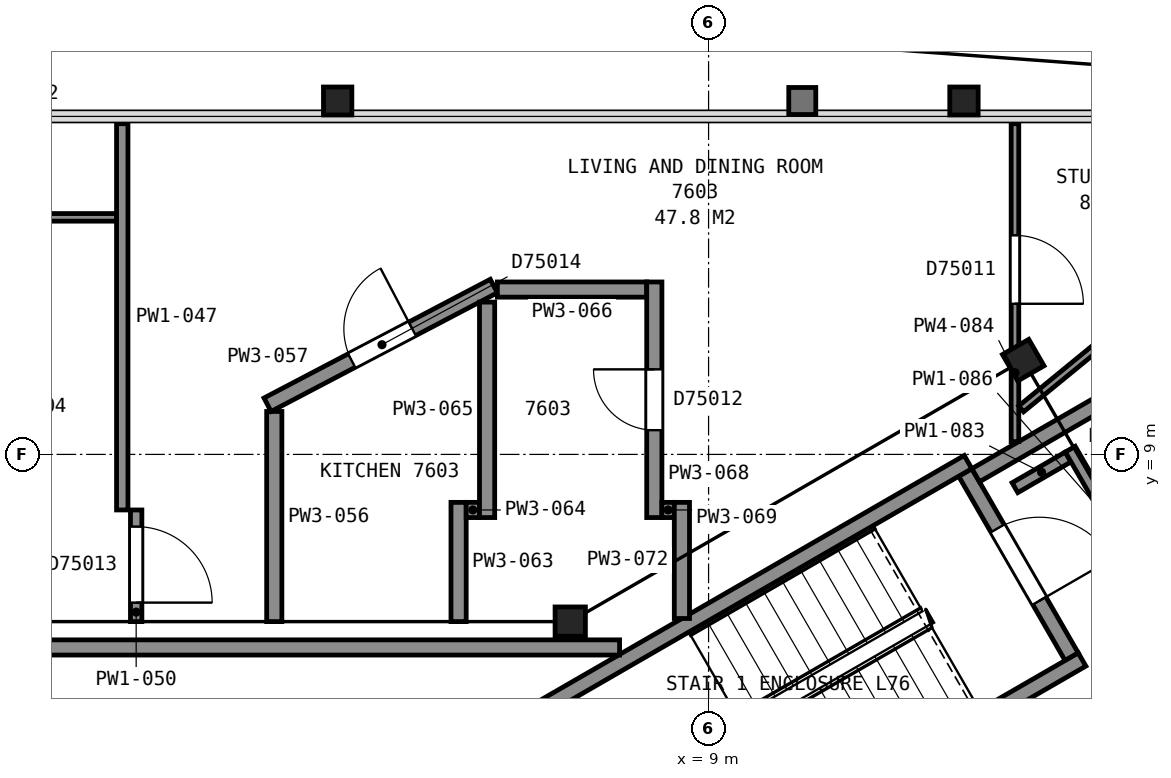
"""IFC4 building model, lengths in metres.
Left out: names, types, materials, properties, quantities, classifications, styles, units other than length and angle.
Written with IfcOpenShell. Run it as: python <this file> out.ifc"""

import sys

from ifc_helpers import new_model, si_unit, direction, frame, frame_2d, origin, origin_2d, place, context, subcontext, project, spatial, rectangle, i_section, extrude, element, fill, save


model = new_model("IFC4")
c1 = context("Model", 3, precision=1e-05, world=origin(), true_north=direction((0.0, 1.0)))
c2 = subcontext(c1, "Body", "Model", "MODEL_VIEW")
j1 = project(units=[si_unit("LENGTHUNIT", "METRE"), si_unit("PLANEANGLEUNIT", "RADIAN")], contexts=[c1])
p1 = place(None, origin())
s1 = spatial("IfcSite", under=j1, at=p1, CompositionType="ELEMENT")
p2 = place(p1, origin())
s2 = spatial("IfcBuilding", under=s1, at=p2, CompositionType="ELEMENT")
p3 = place(p2, frame((0.0, 0.0, 301.0)))
s3 = spatial("IfcBuildingStorey", under=s2, at=p3, CompositionType="ELEMENT", Elevation=301.0)
p4 = place(p3, frame((12.36, 13.65, 0.0), z_axis=(0.0, 0.0, 1.0), x_axis=(1.0, 0.0, 0.0)))
e1 = element("IfcColumn", 1, at=p4, inside=s3, PredefinedType="COLUMN", context=c2, shape_type="SweptSolid", body=[
    extrude(i_section(OverallWidth=0.373, OverallDepth=0.368, WebThickness=0.015, FlangeThickness=0.024, FilletRadius=0.015, at=origin_2d()), origin(), (0.0, 0.0, 1.0), 3.645),
])
p5 = place(p3, frame((4.12, 13.65, 0.0), z_axis=(0.0, 0.0, 1.0), x_axis=(1.0, 0.0, 0.0)))
e2 = element("IfcColumn", 2, at=p5, inside=s3, PredefinedType="COLUMN", context=c2, shape_type="SweptSolid", body=[
    extrude(i_section(OverallWidth=0.373, OverallDepth=0.368, WebThickness=0.015, FlangeThickness=0.024, FilletRadius=0.015, at=origin_2d()), origin(), (0.0, 0.0, 1.0), 3.655),
])
p6 = place(p3, frame((13.14, 10.24, 0.0), z_axis=(0.0, 0.0, 1.0), x_axis=(0.5, -0.866025403784, 0.0)))
e3 = element("IfcColumn", 3, at=p6, inside=s3, PredefinedType="COLUMN", context=c2, shape_type="SweptSolid", body=[
    extrude(i_section(OverallWidth=0.401, OverallDepth=0.399, WebThickness=0.025, FlangeThickness=0.04, FilletRadius=0.015, at=origin_2d()), origin(), (0.0, 0.0, 1.0), 3.7),
])
p7 = place(p3, frame((7.18, 6.8, 0.0), z_axis=(0.0, 0.0, 1.0), x_axis=(1.0, 0.0, 0.0)))
e4 = element("IfcColumn", 4, at=p7, inside=s3, PredefinedType="COLUMN", context=c2, shape_type="SweptSolid", body=[
    extrude(i_section(OverallWidth=0.399, OverallDepth=0.386, WebThickness=0.021, FlangeThickness=0.033, FilletRadius=0.015, at=origin_2d()), origin(), (0.0, 0.0, 1.0), 3.7),
])
p8 = place(p3, frame((13.777, 6.338, 0.0), z_axis=(0.0, 0.0, 1.0), x_axis=(-0.500049511043, 0.865996816683, 0.0)))
e5 = element("IfcWall", 5, at=p8, inside=s3, PredefinedType="PARTITIONING", context=c2, shape_type="SweptSolid", body=[
    extrude(rectangle(XDim=2.8, YDim=0.2, at=frame_2d((1.4, 0.0))), origin(), (0.0, 0.0, 1.0), 3.45),
])
p9 = place(p8, frame((0.85, 0.0, 0.0)))
e6 = element("IfcOpeningElement", 6, at=p9, cuts=e5, PredefinedType="OPENING", context=c2, shape_type="SweptSolid", body=[
    extrude(rectangle(XDim=1.1, YDim=2.1, at=frame_2d((0.55, 1.05))), frame((0.0, 0.11, 0.0), z_axis=(0.0, -1.0, 0.0), x_axis=(1.0, 0.0, 0.0)), (0.0, 0.0, 1.0), 0.22),
])
for number, where, z_axis, x_axis in (
    (7, (6.178, 5.299, 0.0), (0.0, 0.0, 1.0), (0.866, 0.5, 0.0)),
    (8, (7.678, 2.701, 0.0), (0.0, 0.0, 1.0), (0.866, 0.5, 0.0)),
):
    element("IfcWall", number, at=place(p3, frame(where, z_axis=z_axis, x_axis=x_axis)), inside=s3, PredefinedType="PARTITIONING", context=c2, shape_type="SweptSolid", body=[
        extrude(rectangle(XDim=7.2, YDim=0.2, at=frame_2d((3.6, 0.0))), origin(), (0.0, 0.0, 1.0), 3.45),
    ])
p10 = place(p3, frame((7.829, 6.46, 0.0), z_axis=(0.0, 0.0, 1.0), x_axis=(-1.0, 0.0, 0.0)))
e9 = element("IfcWall", 9, at=p10, inside=s3, PredefinedType="PARTITIONING", context=c2, shape_type="SweptSolid", body=[
    extrude(rectangle(XDim=15.658, YDim=0.2, at=frame_2d((7.829, 0.0))), origin(), (0.0, 0.0, 1.0), 3.45),
])
p11 = place(p10, frame((12.168, 0.0, 0.0)))
e10 = element("IfcOpeningElement", 10, at=p11, cuts=e9, PredefinedType="OPENING", context=c2, shape_type="SweptSolid", body=[
    extrude(rectangle(XDim=1.2, YDim=2.1, at=frame_2d((0.6, 1.05))), frame((0.0, 0.11, 0.0), z_axis=(0.0, -1.0, 0.0), x_axis=(1.0, 0.0, 0.0)), (0.0, 0.0, 1.0), 0.22),
])
p12 = place(p3, frame((-3.109, 12.119, 0.0), z_axis=(0.0, 0.0, 1.0), x_axis=(1.0, 0.0, 0.0)))
e11 = element("IfcWall", 11, at=p12, inside=s3, PredefinedType="PARTITIONING", context=c2, shape_type="SweptSolid", body=[
    extrude(rectangle(XDim=4.32, YDim=0.1, at=frame_2d((2.16, 0.0))), origin(), (0.0, 0.0, 1.0), 2.723),
])
p13 = place(p12, frame((1.7, 0.0, 0.0)))
e12 = element("IfcOpeningElement", 12, at=p13, cuts=e11, PredefinedType="OPENING", context=c2, shape_type="SweptSolid", body=[
    extrude(rectangle(XDim=1.0, YDim=2.1, at=frame_2d((0.5, 1.05))), frame((0.0, 0.06, 0.0), z_axis=(0.0, -1.0, 0.0), x_axis=(1.0, 0.0, 0.0)), (0.0, 0.0, 1.0), 0.12),
])
p14 = place(p3, frame((1.286, 8.269, 0.0), z_axis=(0.0, 0.0, 1.0), x_axis=(0.0, 1.0, 0.0)))
e13 = element("IfcWall", 13, at=p14, inside=s3, PredefinedType="PARTITIONING", context=c2, shape_type="SweptSolid", body=[
    extrude(rectangle(XDim=5.082, YDim=0.15, at=frame_2d((2.541, 0.0))), origin(), (0.0, 0.0, 1.0), 2.723),
])
p15 = place(p3, frame((1.469, 8.269, 0.0), z_axis=(0.0, 0.0, 1.0), x_axis=(0.0, -1.0, 0.0)))
e14 = element("IfcWall", 14, at=p15, inside=s3, PredefinedType="PARTITIONING", context=c2, shape_type="SweptSolid", body=[
    extrude(rectangle(XDim=1.469, YDim=0.15, at=frame_2d((0.734, 0.0))), origin(), (0.0, 0.0, 1.0), 2.723),
])
p16 = place(p15, frame((0.219, 0.0, 0.0)))
e15 = element("IfcOpeningElement", 15, at=p16, cuts=e14, PredefinedType="OPENING", context=c2, shape_type="SweptSolid", body=[
    extrude(rectangle(XDim=1.0, YDim=2.1, at=frame_2d((0.5, 1.05))), frame((0.0, 0.085, 0.0), z_axis=(0.0, -1.0, 0.0), x_axis=(1.0, 0.0, 0.0)), (0.0, 0.0, 1.0), 0.17),
])
p17 = place(p3, frame((3.286, 6.8, 0.0), z_axis=(0.0, 0.0, 1.0), x_axis=(0.0, 1.0, 0.0)))
e16 = element("IfcWall", 16, at=p17, inside=s3, PredefinedType="PARTITIONING", context=c2, shape_type="SweptSolid", body=[
    extrude(rectangle(XDim=2.765, YDim=0.2, at=frame_2d((1.382, 0.0))), origin(), (0.0, 0.0, 1.0), 2.723),
])
p18 = place(p3, frame((6.175, 11.216, 0.0), z_axis=(0.0, 0.0, 1.0), x_axis=(-0.885512941371, -0.464614712062, 0.0)))
e17 = element("IfcWall", 17, at=p18, inside=s3, PredefinedType="PARTITIONING", context=c2, shape_type="SweptSolid", body=[
    extrude(rectangle(XDim=3.362, YDim=0.2, at=frame_2d((1.681, 0.0))), origin(), (0.0, 0.0, 1.0), 2.723),
])
p19 = place(p18, frame((1.212, 0.0, 0.0)))
e18 = element("IfcOpeningElement", 18, at=p19, cuts=e17, PredefinedType="OPENING", context=c2, shape_type="SweptSolid", body=[
    extrude(rectangle(XDim=0.9, YDim=2.1, at=frame_2d((0.45, 1.05))), frame((0.0, 0.11, 0.0), z_axis=(0.0, -1.0, 0.0), x_axis=(1.0, 0.0, 0.0)), (0.0, 0.0, 1.0), 0.22),
])
p20 = place(p3, frame((5.711, 6.8, 0.0), z_axis=(0.0, 0.0, 1.0), x_axis=(0.0, 1.0, 0.0)))
e19 = element("IfcWall", 19, at=p20, inside=s3, PredefinedType="PARTITIONING", context=c2, shape_type="SweptSolid", body=[
    extrude(rectangle(XDim=1.569, YDim=0.2, at=frame_2d((0.784, 0.0))), origin(), (0.0, 0.0, 1.0), 2.723),
])
p21 = place(p3, frame((5.811, 8.269, 0.0), z_axis=(0.0, 0.0, 1.0), x_axis=(1.0, 0.0, 0.0)))
e20 = element("IfcWall", 20, at=p21, inside=s3, PredefinedType="PARTITIONING", context=c2, shape_type="SweptSolid", body=[
    extrude(rectangle(XDim=0.175, YDim=0.2, at=frame_2d((0.087, 0.0))), origin(), (0.0, 0.0, 1.0), 2.723),
])
p22 = place(p3, frame((6.086, 8.169, 0.0), z_axis=(0.0, 0.0, 1.0), x_axis=(0.0, 1.0, 0.0)))
e21 = element("IfcWall", 21, at=p22, inside=s3, PredefinedType="PARTITIONING", context=c2, shape_type="SweptSolid", body=[
    extrude(rectangle(XDim=2.835, YDim=0.2, at=frame_2d((1.417, 0.0))), origin(), (0.0, 0.0, 1.0), 2.723),
])
p23 = place(p3, frame((6.221, 11.169, 0.0), z_axis=(0.0, 0.0, 1.0), x_axis=(1.0, 0.0, 0.0)))
e22 = element("IfcWall", 22, at=p23, inside=s3, PredefinedType="PARTITIONING", context=c2, shape_type="SweptSolid", body=[
    extrude(rectangle(XDim=1.965, YDim=0.2, at=frame_2d((0.982, 0.0))), origin(), (0.0, 0.0, 1.0), 2.723),
])
p24 = place(p3, frame((8.286, 8.169, 0.0), z_axis=(0.0, 0.0, 1.0), x_axis=(0.0, 1.0, 0.0)))
e23 = element("IfcWall", 23, at=p24, inside=s3, PredefinedType="PARTITIONING", context=c2, shape_type="SweptSolid", body=[
    extrude(rectangle(XDim=3.1, YDim=0.2, at=frame_2d((1.55, 0.0))), origin(), (0.0, 0.0, 1.0), 2.723),
])
p25 = place(p24, frame((1.15, 0.0, 0.0)))
e24 = element("IfcOpeningElement", 24, at=p25, cuts=e23, PredefinedType="OPENING", context=c2, shape_type="SweptSolid", body=[
    extrude(rectangle(XDim=0.8, YDim=2.1, at=frame_2d((0.4, 1.05))), frame((0.0, 0.11, 0.0), z_axis=(0.0, -1.0, 0.0), x_axis=(1.0, 0.0, 0.0)), (0.0, 0.0, 1.0), 0.22),
])
p26 = place(p3, frame((8.386, 8.269, 0.0), z_axis=(0.0, 0.0, 1.0), x_axis=(1.0, 0.0, 0.0)))
e25 = element("IfcWall", 25, at=p26, inside=s3, PredefinedType="PARTITIONING", context=c2, shape_type="SweptSolid", body=[
    extrude(rectangle(XDim=0.163, YDim=0.2, at=frame_2d((0.082, 0.0))), origin(), (0.0, 0.0, 1.0), 2.723),
])
p27 = place(p3, frame((8.649, 6.841, 0.0), z_axis=(0.0, 0.0, 1.0), x_axis=(0.0, 1.0, 0.0)))
e26 = element("IfcWall", 26, at=p27, inside=s3, PredefinedType="PARTITIONING", context=c2, shape_type="SweptSolid", body=[
    extrude(rectangle(XDim=1.528, YDim=0.2, at=frame_2d((0.764, 0.0))), origin(), (0.0, 0.0, 1.0), 2.723),
])
p28 = place(p3, frame((12.514, 8.726, 0.0), z_axis=(0.0, 0.0, 1.0), x_axis=(0.865969617579, 0.500096612097, 0.0)))
e27 = element("IfcWall", 27, at=p28, inside=s3, PredefinedType="PARTITIONING", context=c2, shape_type="SweptSolid", body=[
    extrude(rectangle(XDim=2.899, YDim=0.2, at=frame_2d((1.45, 0.0))), origin(), (0.0, 0.0, 1.0), 2.723),
])
p29 = place(p3, frame((13.031, 8.562, 0.0), z_axis=(0.0, 0.0, 1.0), x_axis=(0.865798205633, 0.500393312429, 0.0)))
e28 = element("IfcWall", 28, at=p29, inside=s3, PredefinedType="PARTITIONING", context=c2, shape_type="SweptSolid", body=[
    extrude(rectangle(XDim=0.808, YDim=0.15, at=frame_2d((0.404, 0.0))), origin(), (0.0, 0.0, 1.0), 2.723),
])
p30 = place(p3, frame((13.031, 13.351, 0.0), z_axis=(0.0, 0.0, 1.0), x_axis=(0.0, -1.0, 0.0)))
e29 = element("IfcWall", 29, at=p30, inside=s3, PredefinedType="PARTITIONING", context=c2, shape_type="SweptSolid", body=[
    extrude(rectangle(XDim=4.183, YDim=0.1, at=frame_2d((2.091, 0.0))), origin(), (0.0, 0.0, 1.0), 2.723),
])
p31 = place(p30, frame((1.469, 0.0, 0.0)))
e30 = element("IfcOpeningElement", 30, at=p31, cuts=e29, PredefinedType="OPENING", context=c2, shape_type="SweptSolid", body=[
    extrude(rectangle(XDim=0.9, YDim=2.1, at=frame_2d((0.45, 1.05))), frame((0.0, 0.06, 0.0), z_axis=(0.0, -1.0, 0.0), x_axis=(1.0, 0.0, 0.0)), (0.0, 0.0, 1.0), 0.12),
])
p32 = place(p3, frame((17.733, 13.38, 0.0), z_axis=(0.0, 0.0, 1.0), x_axis=(-0.773858908961, -0.633358025939, 0.0)))
e31 = element("IfcWall", 31, at=p32, inside=s3, PredefinedType="PARTITIONING", context=c2, shape_type="SweptSolid", body=[
    extrude(rectangle(XDim=5.97, YDim=0.1, at=frame_2d((2.985, 0.0))), origin(), (0.0, 0.0, 1.0), 2.723),
])
p33 = place(p32, frame((2.626, 0.0, 0.0)))
e32 = element("IfcOpeningElement", 32, at=p33, cuts=e31, PredefinedType="OPENING", context=c2, shape_type="SweptSolid", body=[
    extrude(rectangle(XDim=1.0, YDim=2.1, at=frame_2d((0.5, 1.05))), frame((0.0, 0.06, 0.0), z_axis=(0.0, -1.0, 0.0), x_axis=(1.0, 0.0, 0.0)), (0.0, 0.0, 1.0), 0.12),
])
p34 = place(p3, frame((13.759, 9.069, 0.0), z_axis=(0.0, 0.0, 1.0), x_axis=(0.500046885369, -0.865998332812, 0.0)))
e33 = element("IfcWall", 33, at=p34, inside=s3, PredefinedType="PARTITIONING", context=c2, shape_type="SweptSolid", body=[
    extrude(rectangle(XDim=2.345, YDim=0.15, at=frame_2d((1.172, 0.0))), origin(), (0.0, 0.0, 1.0), 2.723),
])
p35 = place(p9, origin())
e34 = element("IfcDoor", 34, at=p35, inside=s3, OperationType="SINGLE_SWING_LEFT", PredefinedType="DOOR", context=c2, shape_type="SweptSolid", body=[
    extrude(rectangle(XDim=1.1, YDim=2.1, at=frame_2d((0.55, 1.05))), frame((0.0, 0.025, 0.0), z_axis=(0.0, -1.0, 0.0), x_axis=(1.0, 0.0, 0.0)), (0.0, 0.0, 1.0), 0.05),
])
fill(e6, e34)
p36 = place(p16, origin())
e35 = element("IfcDoor", 35, at=p36, inside=s3, OperationType="SINGLE_SWING_RIGHT", PredefinedType="DOOR", context=c2, shape_type="SweptSolid", body=[
    extrude(rectangle(XDim=1.0, YDim=2.1, at=frame_2d((0.5, 1.05))), frame((0.0, 0.025, 0.0), z_axis=(0.0, -1.0, 0.0), x_axis=(1.0, 0.0, 0.0)), (0.0, 0.0, 1.0), 0.05),
])
fill(e15, e35)
p37 = place(p19, origin())
e36 = element("IfcDoor", 36, at=p37, inside=s3, OperationType="SINGLE_SWING_LEFT", PredefinedType="DOOR", context=c2, shape_type="SweptSolid", body=[
    extrude(rectangle(XDim=0.9, YDim=2.1, at=frame_2d((0.45, 1.05))), frame((0.0, 0.025, 0.0), z_axis=(0.0, -1.0, 0.0), x_axis=(1.0, 0.0, 0.0)), (0.0, 0.0, 1.0), 0.05),
])
fill(e18, e36)
p38 = place(p25, origin())
e37 = element("IfcDoor", 37, at=p38, inside=s3, OperationType="SINGLE_SWING_RIGHT", PredefinedType="DOOR", context=c2, shape_type="SweptSolid", body=[
    extrude(rectangle(XDim=0.8, YDim=2.1, at=frame_2d((0.4, 1.05))), frame((0.0, 0.025, 0.0), z_axis=(0.0, -1.0, 0.0), x_axis=(1.0, 0.0, 0.0)), (0.0, 0.0, 1.0), 0.05),
])
fill(e24, e37)
p39 = place(p31, origin())
e38 = element("IfcDoor", 38, at=p39, inside=s3, OperationType="SINGLE_SWING_RIGHT", PredefinedType="DOOR", context=c2, shape_type="SweptSolid", body=[
    extrude(rectangle(XDim=0.9, YDim=2.1, at=frame_2d((0.45, 1.05))), frame((0.0, 0.025, 0.0), z_axis=(0.0, -1.0, 0.0), x_axis=(1.0, 0.0, 0.0)), (0.0, 0.0, 1.0), 0.05),
])
fill(e30, e38)
save(model, sys.argv[1])
